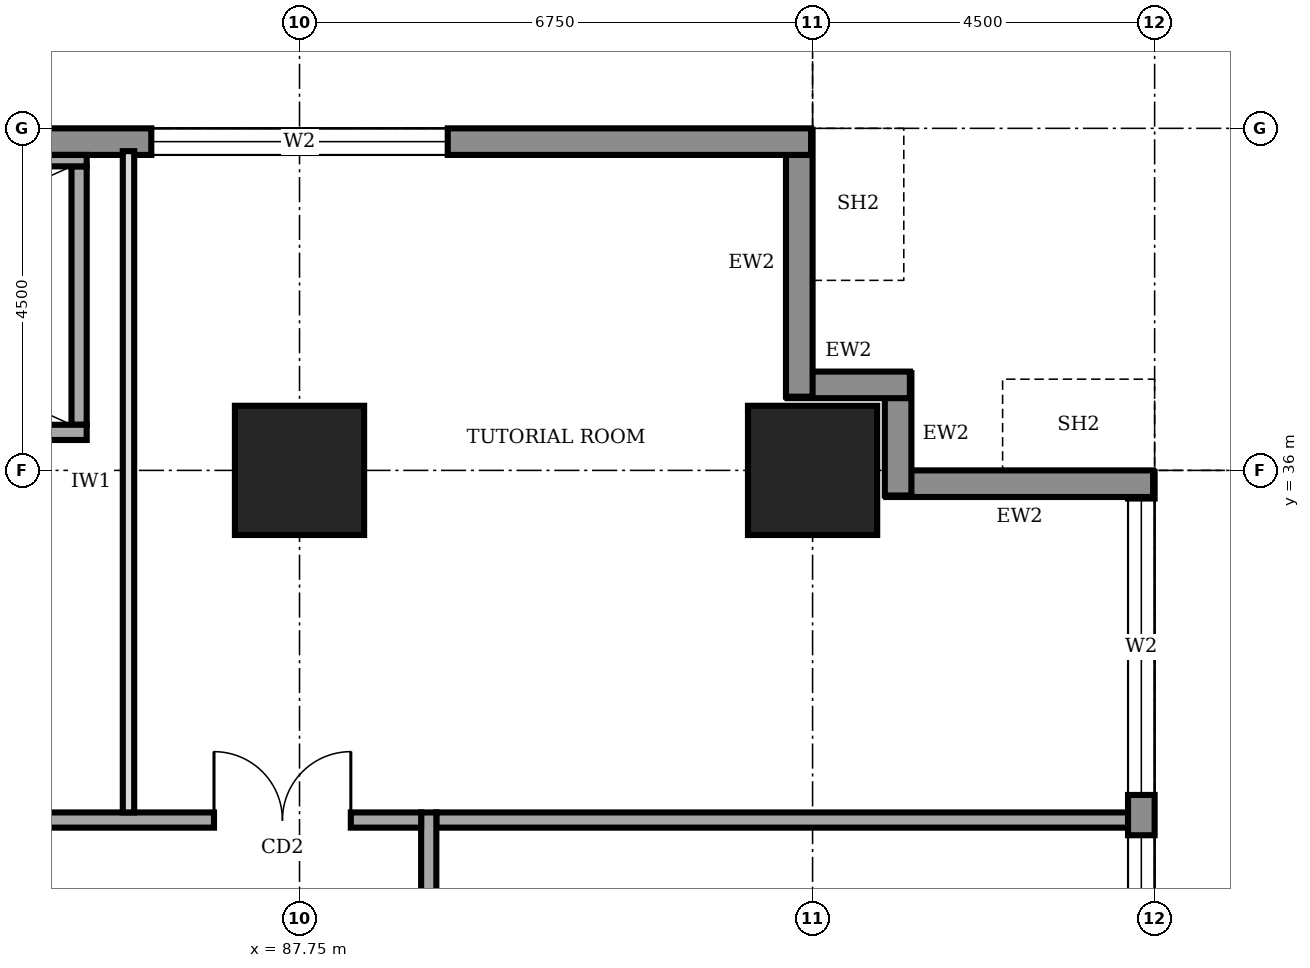
"""IFC4 building model, lengths in metres.
Left out: names, types, materials, properties, quantities, classifications, styles, units other than length and angle.
Written with IfcOpenShell. Run it as: python <this file> out.ifc"""

import sys

from ifc_helpers import new_model, si_unit, direction, frame, frame_2d, origin, origin_2d, place, context, subcontext, project, spatial, rectangle, extrude, element, fill, save


model = new_model("IFC4")
c1 = context("Model", 3, precision=1e-05, world=origin(), true_north=direction((0.0, 1.0)))
c2 = subcontext(c1, "Body", "Model", "MODEL_VIEW")
j1 = project(units=[si_unit("LENGTHUNIT", "METRE"), si_unit("PLANEANGLEUNIT", "RADIAN")], contexts=[c1])
p1 = place(None, origin())
s1 = spatial("IfcSite", under=j1, at=p1, CompositionType="ELEMENT")
p2 = place(p1, origin())
s2 = spatial("IfcBuilding", under=s1, at=p2, CompositionType="ELEMENT")
p3 = place(p2, frame((0.0, 0.0, 73.0)))
s3 = spatial("IfcBuildingStorey", under=s2, at=p3, CompositionType="ELEMENT", Elevation=73.0)
for number, where, z_axis, x_axis in (
    (1, (87.75, 36.0, 0.0), (0.0, 0.0, 1.0), (1.0, 0.0, 0.0)),
    (2, (94.5, 36.0, 0.0), (0.0, 0.0, 1.0), (1.0, 0.0, 0.0)),
):
    element("IfcColumn", number, at=place(p3, frame(where, z_axis=z_axis, x_axis=x_axis)), inside=s3, PredefinedType="COLUMN", context=c2, shape_type="SweptSolid", body=[
        extrude(rectangle(XDim=1.7, YDim=1.7, at=origin_2d()), origin(), (0.0, 0.0, 1.0), 4.0),
    ])
p4 = place(p3, frame((98.825, 4.52, 0.0), z_axis=(0.0, 0.0, 1.0), x_axis=(0.0, 1.0, 0.0)))
e3 = element("IfcWall", 3, at=p4, inside=s3, PredefinedType="STANDARD", context=c2, shape_type="SweptSolid", body=[
    extrude(rectangle(XDim=31.46, YDim=0.35, at=frame_2d((15.73, 0.0))), origin(), (0.0, 0.0, 1.0), 3.75),
])
p5 = place(p4, frame((4.78, 0.0, 0.6)))
e4 = element("IfcOpeningElement", 4, at=p5, cuts=e3, PredefinedType="OPENING", context=c2, shape_type="SweptSolid", body=[
    extrude(rectangle(XDim=3.9, YDim=2.6, at=frame_2d((1.95, 1.3))), frame((0.0, 0.185, 0.0), z_axis=(0.0, -1.0, 0.0), x_axis=(1.0, 0.0, 0.0)), (0.0, 0.0, 1.0), 0.37),
])
p6 = place(p4, frame((9.28, 0.0, 0.6)))
e5 = element("IfcOpeningElement", 5, at=p6, cuts=e3, PredefinedType="OPENING", context=c2, shape_type="SweptSolid", body=[
    extrude(rectangle(XDim=3.9, YDim=2.6, at=frame_2d((1.95, 1.3))), frame((0.0, 0.185, 0.0), z_axis=(0.0, -1.0, 0.0), x_axis=(1.0, 0.0, 0.0)), (0.0, 0.0, 1.0), 0.37),
])
p7 = place(p4, frame((13.78, 0.0, 0.6)))
e6 = element("IfcOpeningElement", 6, at=p7, cuts=e3, PredefinedType="OPENING", context=c2, shape_type="SweptSolid", body=[
    extrude(rectangle(XDim=3.9, YDim=2.6, at=frame_2d((1.95, 1.3))), frame((0.0, 0.185, 0.0), z_axis=(0.0, -1.0, 0.0), x_axis=(1.0, 0.0, 0.0)), (0.0, 0.0, 1.0), 0.37),
])
p8 = place(p4, frame((18.28, 0.0, 0.6)))
e7 = element("IfcOpeningElement", 7, at=p8, cuts=e3, PredefinedType="OPENING", context=c2, shape_type="SweptSolid", body=[
    extrude(rectangle(XDim=3.9, YDim=2.6, at=frame_2d((1.95, 1.3))), frame((0.0, 0.185, 0.0), z_axis=(0.0, -1.0, 0.0), x_axis=(1.0, 0.0, 0.0)), (0.0, 0.0, 1.0), 0.37),
])
p9 = place(p4, frame((22.78, 0.0, 0.6)))
e8 = element("IfcOpeningElement", 8, at=p9, cuts=e3, PredefinedType="OPENING", context=c2, shape_type="SweptSolid", body=[
    extrude(rectangle(XDim=3.9, YDim=2.6, at=frame_2d((1.95, 1.3))), frame((0.0, 0.185, 0.0), z_axis=(0.0, -1.0, 0.0), x_axis=(1.0, 0.0, 0.0)), (0.0, 0.0, 1.0), 0.37),
])
p10 = place(p4, frame((27.21, 0.0, 0.6)))
e9 = element("IfcOpeningElement", 9, at=p10, cuts=e3, PredefinedType="OPENING", context=c2, shape_type="SweptSolid", body=[
    extrude(rectangle(XDim=3.9, YDim=2.6, at=frame_2d((1.95, 1.3))), frame((0.0, 0.185, 0.0), z_axis=(0.0, -1.0, 0.0), x_axis=(1.0, 0.0, 0.0)), (0.0, 0.0, 1.0), 0.37),
])
p11 = place(p3, frame((98.98, 35.825, 0.0), z_axis=(0.0, 0.0, 1.0), x_axis=(-1.0, 0.0, 0.0)))
e10 = element("IfcWall", 10, at=p11, inside=s3, PredefinedType="STANDARD", context=c2, shape_type="SweptSolid", body=[
    extrude(rectangle(XDim=3.51, YDim=0.35, at=frame_2d((1.755, 0.0))), origin(), (0.0, 0.0, 1.0), 2.75),
])
for number, where, z_axis, x_axis in (
    (11, (95.625, 35.67, 0.0), (0.0, 0.0, 1.0), (0.0, 1.0, 0.0)),
    (12, (95.78, 37.125, 0.0), (0.0, 0.0, 1.0), (-1.0, 0.0, 0.0)),
):
    element("IfcWall", number, at=place(p3, frame(where, z_axis=z_axis, x_axis=x_axis)), inside=s3, PredefinedType="STANDARD", context=c2, shape_type="SweptSolid", body=[
        extrude(rectangle(XDim=1.61, YDim=0.35, at=frame_2d((0.805, 0.0))), origin(), (0.0, 0.0, 1.0), 3.75),
    ])
p12 = place(p3, frame((94.325, 36.97, 0.0), z_axis=(0.0, 0.0, 1.0), x_axis=(0.0, 1.0, 0.0)))
e13 = element("IfcWall", 13, at=p12, inside=s3, PredefinedType="STANDARD", context=c2, shape_type="SweptSolid", body=[
    extrude(rectangle(XDim=3.51, YDim=0.35, at=frame_2d((1.755, 0.0))), origin(), (0.0, 0.0, 1.0), 2.75),
])
p13 = place(p3, frame((94.48, 40.325, 0.0), z_axis=(0.0, 0.0, 1.0), x_axis=(-1.0, 0.0, 0.0)))
e14 = element("IfcWall", 14, at=p13, inside=s3, PredefinedType="STANDARD", context=c2, shape_type="SweptSolid", body=[
    extrude(rectangle(XDim=26.96, YDim=0.35, at=frame_2d((13.48, 0.0))), origin(), (0.0, 0.0, 1.0), 3.75),
])
p14 = place(p13, frame((22.71, 0.0, 0.6)))
e15 = element("IfcOpeningElement", 15, at=p14, cuts=e14, PredefinedType="OPENING", context=c2, shape_type="SweptSolid", body=[
    extrude(rectangle(XDim=3.9, YDim=2.6, at=frame_2d((1.95, 1.3))), frame((0.0, 0.185, 0.0), z_axis=(0.0, -1.0, 0.0), x_axis=(1.0, 0.0, 0.0)), (0.0, 0.0, 1.0), 0.37),
])
p15 = place(p13, frame((18.28, 0.0, 0.6)))
e16 = element("IfcOpeningElement", 16, at=p15, cuts=e14, PredefinedType="OPENING", context=c2, shape_type="SweptSolid", body=[
    extrude(rectangle(XDim=3.9, YDim=2.6, at=frame_2d((1.95, 1.3))), frame((0.0, 0.185, 0.0), z_axis=(0.0, -1.0, 0.0), x_axis=(1.0, 0.0, 0.0)), (0.0, 0.0, 1.0), 0.37),
])
p16 = place(p13, frame((4.78, 0.0, 0.6)))
e17 = element("IfcOpeningElement", 17, at=p16, cuts=e14, PredefinedType="OPENING", context=c2, shape_type="SweptSolid", body=[
    extrude(rectangle(XDim=3.9, YDim=2.6, at=frame_2d((1.95, 1.3))), frame((0.0, 0.185, 0.0), z_axis=(0.0, -1.0, 0.0), x_axis=(1.0, 0.0, 0.0)), (0.0, 0.0, 1.0), 0.37),
])
p17 = place(p3, frame((89.45, 9.2, 0.0), z_axis=(0.0, 0.0, 1.0), x_axis=(0.0, 1.0, 0.0)))
e18 = element("IfcWall", 18, at=p17, inside=s3, PredefinedType="SOLIDWALL", context=c2, shape_type="SweptSolid", body=[
    extrude(rectangle(XDim=22.3, YDim=0.2, at=frame_2d((11.15, 0.0))), origin(), (0.0, 0.0, 1.0), 3.75),
])
p18 = place(p17, frame((1.55, 0.0, 0.0)))
e19 = element("IfcOpeningElement", 19, at=p18, cuts=e18, PredefinedType="OPENING", context=c2, shape_type="SweptSolid", body=[
    extrude(rectangle(XDim=1.0, YDim=2.1, at=frame_2d((0.5, 1.05))), frame((0.0, 0.11, 0.0), z_axis=(0.0, -1.0, 0.0), x_axis=(1.0, 0.0, 0.0)), (0.0, 0.0, 1.0), 0.22),
])
p19 = place(p17, frame((5.55, 0.0, 0.0)))
e20 = element("IfcOpeningElement", 20, at=p19, cuts=e18, PredefinedType="OPENING", context=c2, shape_type="SweptSolid", body=[
    extrude(rectangle(XDim=0.9, YDim=2.1, at=frame_2d((0.45, 1.05))), frame((0.0, 0.11, 0.0), z_axis=(0.0, -1.0, 0.0), x_axis=(1.0, 0.0, 0.0)), (0.0, 0.0, 1.0), 0.22),
])
p20 = place(p17, frame((10.35, 0.0, 0.0)))
e21 = element("IfcOpeningElement", 21, at=p20, cuts=e18, PredefinedType="OPENING", context=c2, shape_type="SweptSolid", body=[
    extrude(rectangle(XDim=0.9, YDim=2.1, at=frame_2d((0.45, 1.05))), frame((0.0, 0.11, 0.0), z_axis=(0.0, -1.0, 0.0), x_axis=(1.0, 0.0, 0.0)), (0.0, 0.0, 1.0), 0.22),
])
p21 = place(p17, frame((13.4, 0.0, 0.0)))
e22 = element("IfcOpeningElement", 22, at=p21, cuts=e18, PredefinedType="OPENING", context=c2, shape_type="SweptSolid", body=[
    extrude(rectangle(XDim=0.9, YDim=2.1, at=frame_2d((0.45, 1.05))), frame((0.0, 0.11, 0.0), z_axis=(0.0, -1.0, 0.0), x_axis=(1.0, 0.0, 0.0)), (0.0, 0.0, 1.0), 0.22),
])
p22 = place(p17, frame((16.3, 0.0, 0.0)))
e23 = element("IfcOpeningElement", 23, at=p22, cuts=e18, PredefinedType="OPENING", context=c2, shape_type="SweptSolid", body=[
    extrude(rectangle(XDim=1.0, YDim=2.1, at=frame_2d((0.5, 1.05))), frame((0.0, 0.11, 0.0), z_axis=(0.0, -1.0, 0.0), x_axis=(1.0, 0.0, 0.0)), (0.0, 0.0, 1.0), 0.22),
])
p23 = place(p17, frame((8.2, 0.0, 0.0)))
e24 = element("IfcOpeningElement", 24, at=p23, cuts=e18, PredefinedType="OPENING", context=c2, shape_type="SweptSolid", body=[
    extrude(rectangle(XDim=1.0, YDim=2.1, at=frame_2d((0.5, 1.05))), frame((0.0, 0.11, 0.0), z_axis=(0.0, -1.0, 0.0), x_axis=(1.0, 0.0, 0.0)), (0.0, 0.0, 1.0), 0.22),
])
p24 = place(p17, frame((19.55, 0.0, 0.0)))
e25 = element("IfcOpeningElement", 25, at=p24, cuts=e18, PredefinedType="OPENING", context=c2, shape_type="SweptSolid", body=[
    extrude(rectangle(XDim=1.0, YDim=2.1, at=frame_2d((0.5, 1.05))), frame((0.0, 0.11, 0.0), z_axis=(0.0, -1.0, 0.0), x_axis=(1.0, 0.0, 0.0)), (0.0, 0.0, 1.0), 0.22),
])
p25 = place(p3, frame((89.35, 31.4, 0.0), z_axis=(0.0, 0.0, 1.0), x_axis=(-1.0, 0.0, 0.0)))
e26 = element("IfcWall", 26, at=p25, inside=s3, PredefinedType="SOLIDWALL", context=c2, shape_type="SweptSolid", body=[
    extrude(rectangle(XDim=16.9, YDim=0.2, at=frame_2d((8.45, 0.0))), origin(), (0.0, 0.0, 1.0), 3.75),
])
p26 = place(p25, frame((13.975, 0.0, 0.0)))
e27 = element("IfcOpeningElement", 27, at=p26, cuts=e26, PredefinedType="OPENING", context=c2, shape_type="SweptSolid", body=[
    extrude(rectangle(XDim=1.8, YDim=2.1, at=frame_2d((0.9, 1.05))), frame((0.0, 0.11, 0.0), z_axis=(0.0, -1.0, 0.0), x_axis=(1.0, 0.0, 0.0)), (0.0, 0.0, 1.0), 0.22),
])
p27 = place(p25, frame((7.85, 0.0, 0.0)))
e28 = element("IfcOpeningElement", 28, at=p27, cuts=e26, PredefinedType="OPENING", context=c2, shape_type="SweptSolid", body=[
    extrude(rectangle(XDim=1.0, YDim=2.1, at=frame_2d((0.5, 1.05))), frame((0.0, 0.11, 0.0), z_axis=(0.0, -1.0, 0.0), x_axis=(1.0, 0.0, 0.0)), (0.0, 0.0, 1.0), 0.22),
])
p28 = place(p25, frame((0.925, 0.0, 0.0)))
e29 = element("IfcOpeningElement", 29, at=p28, cuts=e26, PredefinedType="OPENING", context=c2, shape_type="SweptSolid", body=[
    extrude(rectangle(XDim=1.8, YDim=2.1, at=frame_2d((0.9, 1.05))), frame((0.0, 0.11, 0.0), z_axis=(0.0, -1.0, 0.0), x_axis=(1.0, 0.0, 0.0)), (0.0, 0.0, 1.0), 0.22),
])
p29 = place(p3, frame((89.55, 31.4, 0.0), z_axis=(0.0, 0.0, 1.0), x_axis=(1.0, 0.0, 0.0)))
e30 = element("IfcWall", 30, at=p29, inside=s3, PredefinedType="SOLIDWALL", context=c2, shape_type="SweptSolid", body=[
    extrude(rectangle(XDim=9.15, YDim=0.2, at=frame_2d((4.575, 0.0))), origin(), (0.0, 0.0, 1.0), 3.75),
])
p30 = place(p3, frame((85.5, 31.5, 0.0), z_axis=(0.0, 0.0, 1.0), x_axis=(0.0, 1.0, 0.0)))
e31 = element("IfcWall", 31, at=p30, inside=s3, PredefinedType="PARTITIONING", context=c2, shape_type="SweptSolid", body=[
    extrude(rectangle(XDim=8.7, YDim=0.15, at=frame_2d((4.35, 0.0))), origin(), (0.0, 0.0, 1.0), 3.75),
])
p31 = place(p3, frame((77.05, 36.5, 0.0), z_axis=(0.0, 0.0, 1.0), x_axis=(1.0, 0.0, 0.0)))
e32 = element("IfcWall", 32, at=p31, inside=s3, PredefinedType="SOLIDWALL", context=c2, shape_type="SweptSolid", body=[
    extrude(rectangle(XDim=7.9, YDim=0.2, at=frame_2d((3.95, 0.0))), origin(), (0.0, 0.0, 1.0), 3.75),
])
p32 = place(p31, frame((6.3, 0.0, 0.0)))
e33 = element("IfcOpeningElement", 33, at=p32, cuts=e32, PredefinedType="OPENING", context=c2, shape_type="SweptSolid", body=[
    extrude(rectangle(XDim=1.0, YDim=2.1, at=frame_2d((0.5, 1.05))), frame((0.0, 0.11, 0.0), z_axis=(0.0, -1.0, 0.0), x_axis=(1.0, 0.0, 0.0)), (0.0, 0.0, 1.0), 0.22),
])
p33 = place(p3, frame((77.05, 40.075, 0.0), z_axis=(0.0, 0.0, 1.0), x_axis=(1.0, 0.0, 0.0)))
e34 = element("IfcWall", 34, at=p33, inside=s3, PredefinedType="SOLIDWALL", context=c2, shape_type="SweptSolid", body=[
    extrude(rectangle(XDim=7.9, YDim=0.15, at=frame_2d((3.95, 0.0))), origin(), (0.0, 0.0, 1.0), 3.75),
])
p34 = place(p3, frame((84.85, 36.6, 0.0), z_axis=(0.0, 0.0, 1.0), x_axis=(0.0, 1.0, 0.0)))
e35 = element("IfcWall", 35, at=p34, inside=s3, PredefinedType="SOLIDWALL", context=c2, shape_type="SweptSolid", body=[
    extrude(rectangle(XDim=3.4, YDim=0.2, at=frame_2d((1.7, 0.0))), origin(), (0.0, 0.0, 1.0), 3.75),
])
p35 = place(p9, origin())
e36 = element("IfcWindow", 36, at=p35, inside=s3, PartitioningType="SINGLE_PANEL", PredefinedType="WINDOW", context=c2, shape_type="SweptSolid", body=[
    extrude(rectangle(XDim=3.9, YDim=2.6, at=frame_2d((1.95, 1.3))), frame((0.0, 0.03, 0.0), z_axis=(0.0, -1.0, 0.0), x_axis=(1.0, 0.0, 0.0)), (0.0, 0.0, 1.0), 0.06),
])
fill(e8, e36)
p36 = place(p10, origin())
e37 = element("IfcWindow", 37, at=p36, inside=s3, PartitioningType="SINGLE_PANEL", PredefinedType="WINDOW", context=c2, shape_type="SweptSolid", body=[
    extrude(rectangle(XDim=3.9, YDim=2.6, at=frame_2d((1.95, 1.3))), frame((0.0, 0.03, 0.0), z_axis=(0.0, -1.0, 0.0), x_axis=(1.0, 0.0, 0.0)), (0.0, 0.0, 1.0), 0.06),
])
fill(e9, e37)
p37 = place(p16, origin())
e38 = element("IfcWindow", 38, at=p37, inside=s3, PartitioningType="SINGLE_PANEL", PredefinedType="WINDOW", context=c2, shape_type="SweptSolid", body=[
    extrude(rectangle(XDim=3.9, YDim=2.6, at=frame_2d((1.95, 1.3))), frame((0.0, 0.03, 0.0), z_axis=(0.0, -1.0, 0.0), x_axis=(1.0, 0.0, 0.0)), (0.0, 0.0, 1.0), 0.06),
])
fill(e17, e38)
p38 = place(p28, frame((1.8, 0.0, 0.0), z_axis=(0.0, 0.0, 1.0), x_axis=(-1.0, 0.0, 0.0)))
e39 = element("IfcDoor", 39, at=p38, inside=s3, OperationType="DOUBLE_DOOR_SINGLE_SWING", PredefinedType="DOOR", context=c2, shape_type="SweptSolid", body=[
    extrude(rectangle(XDim=1.8, YDim=2.1, at=frame_2d((0.9, 1.05))), frame((0.0, 0.025, 0.0), z_axis=(0.0, -1.0, 0.0), x_axis=(1.0, 0.0, 0.0)), (0.0, 0.0, 1.0), 0.05),
])
fill(e29, e39)
save(model, sys.argv[1])
